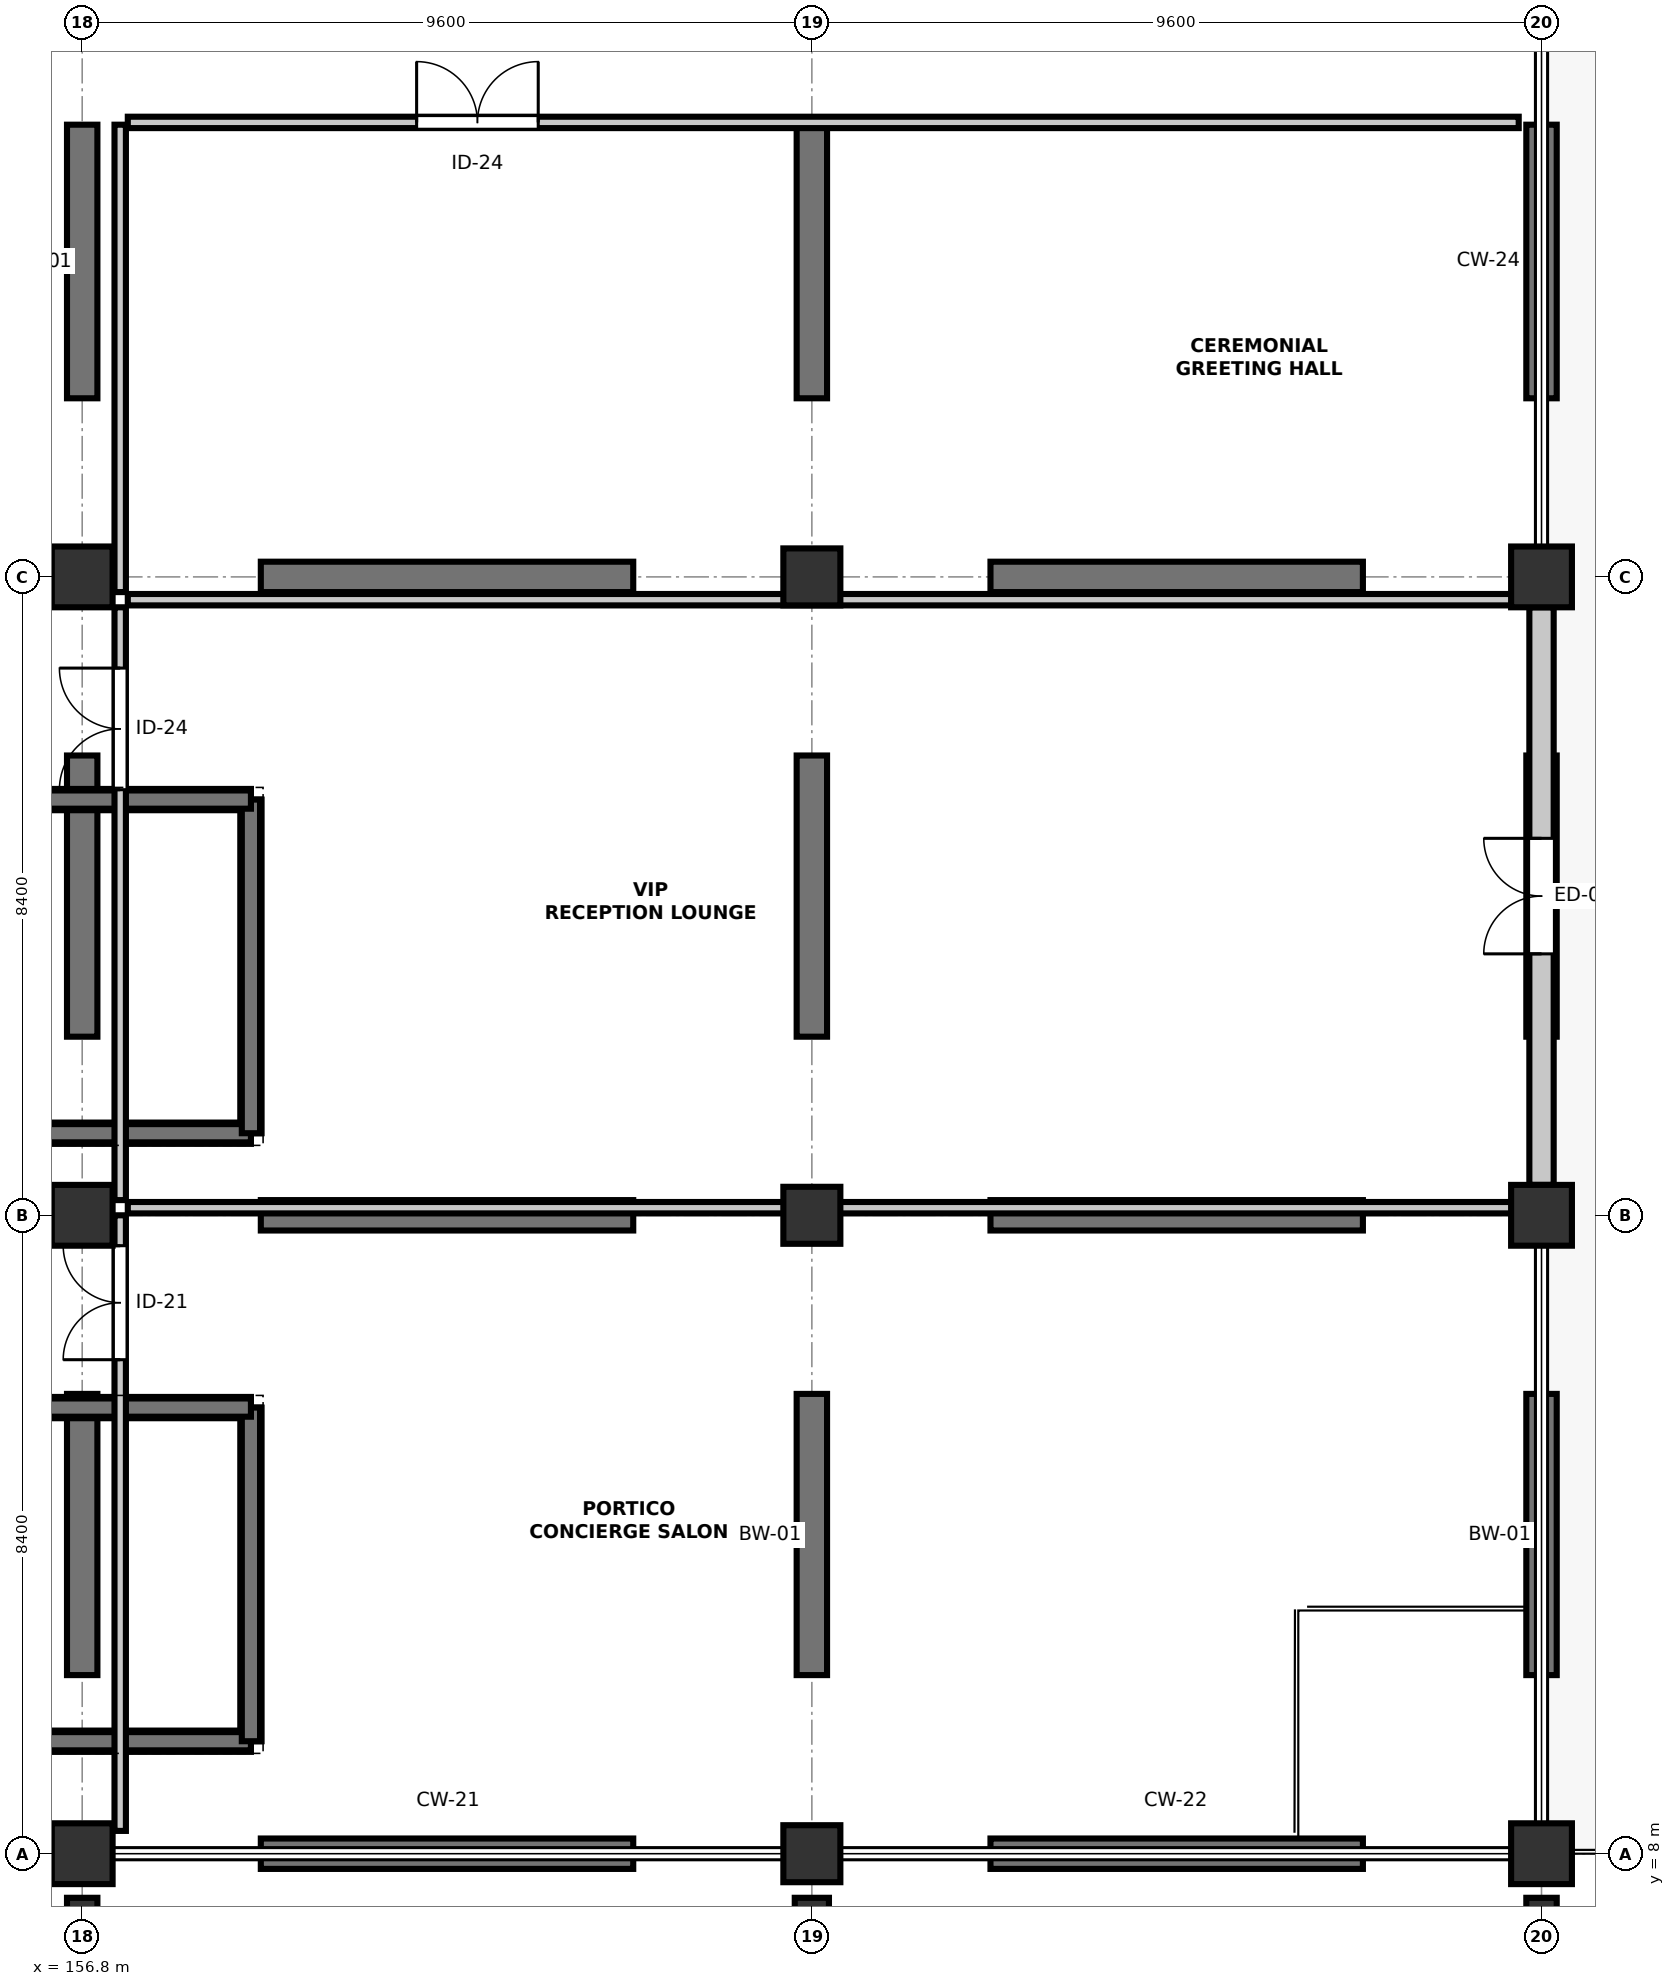
"""IFC4 building model, lengths in metres.
Left out: names, types, materials, properties, quantities, classifications, styles, units other than length and angle.
Written with IfcOpenShell. Run it as: python <this file> out.ifc"""

import sys

from ifc_helpers import new_model, si_unit, direction, frame, frame_2d, origin, origin_2d, place, context, subcontext, project, spatial, rectangle, extrude, element, fill, save


model = new_model("IFC4")
c1 = context("Model", 3, precision=1e-05, world=origin(), true_north=direction((0.0, 1.0)))
c2 = subcontext(c1, "Body", "Model", "MODEL_VIEW")
j1 = project(units=[si_unit("LENGTHUNIT", "METRE"), si_unit("PLANEANGLEUNIT", "RADIAN")], contexts=[c1])
p1 = place(None, origin())
s1 = spatial("IfcSite", under=j1, at=p1, CompositionType="ELEMENT")
p2 = place(p1, origin())
s2 = spatial("IfcBuilding", under=s1, at=p2, CompositionType="ELEMENT")
p3 = place(p2, frame((0.0, 0.0, 4.8)))
s3 = spatial("IfcBuildingStorey", under=s2, at=p3, CompositionType="ELEMENT", Elevation=4.8)
p4 = place(p3, frame((156.8, 8.0, 0.0), z_axis=(0.0, 0.0, 1.0), x_axis=(1.0, 0.0, 0.0)))
e1 = element("IfcColumn", 1, at=p4, inside=s3, PredefinedType="COLUMN", context=c2, shape_type="SweptSolid", body=[
    extrude(rectangle(XDim=0.8, YDim=0.8, at=origin_2d()), origin(), (0.0, 0.0, 1.0), 4.8),
])
p5 = place(p3, frame((156.8, 7.095, 0.0), z_axis=(0.0, 0.0, 1.0), x_axis=(1.0, 0.0, 0.0)))
e2 = element("IfcColumn", 2, at=p5, inside=s3, PredefinedType="PILASTER", context=c2, shape_type="SweptSolid", body=[
    extrude(rectangle(XDim=0.4, YDim=0.65, at=origin_2d()), origin(), (0.0, 0.0, 1.0), 4.8),
])
for number, where, z_axis, x_axis in (
    (3, (156.8, 16.4, 0.0), (0.0, 0.0, 1.0), (1.0, 0.0, 0.0)),
    (4, (156.8, 24.8, 0.0), (0.0, 0.0, 1.0), (1.0, 0.0, 0.0)),
):
    element("IfcColumn", number, at=place(p3, frame(where, z_axis=z_axis, x_axis=x_axis)), inside=s3, PredefinedType="COLUMN", context=c2, shape_type="SweptSolid", body=[
        extrude(rectangle(XDim=0.8, YDim=0.8, at=origin_2d()), origin(), (0.0, 0.0, 1.0), 4.8),
    ])
p6 = place(p3, frame((166.4, 8.0, 0.0), z_axis=(0.0, 0.0, 1.0), x_axis=(1.0, 0.0, 0.0)))
e5 = element("IfcColumn", 5, at=p6, inside=s3, PredefinedType="COLUMN", context=c2, shape_type="SweptSolid", body=[
    extrude(rectangle(XDim=0.75, YDim=0.75, at=origin_2d()), origin(), (0.0, 0.0, 1.0), 4.8),
])
p7 = place(p3, frame((166.4, 7.045, 0.0), z_axis=(0.0, 0.0, 1.0), x_axis=(1.0, 0.0, 0.0)))
e6 = element("IfcColumn", 6, at=p7, inside=s3, PredefinedType="PILASTER", context=c2, shape_type="SweptSolid", body=[
    extrude(rectangle(XDim=0.45, YDim=0.75, at=origin_2d()), origin(), (0.0, 0.0, 1.0), 4.8),
])
for number, where, z_axis, x_axis in (
    (7, (166.4, 16.4, 0.0), (0.0, 0.0, 1.0), (1.0, 0.0, 0.0)),
    (8, (166.4, 24.8, 0.0), (0.0, 0.0, 1.0), (1.0, 0.0, 0.0)),
):
    element("IfcColumn", number, at=place(p3, frame(where, z_axis=z_axis, x_axis=x_axis)), inside=s3, PredefinedType="COLUMN", context=c2, shape_type="SweptSolid", body=[
        extrude(rectangle(XDim=0.75, YDim=0.75, at=origin_2d()), origin(), (0.0, 0.0, 1.0), 4.8),
    ])
p8 = place(p3, frame((176.0, 8.0, 0.0), z_axis=(0.0, 0.0, 1.0), x_axis=(1.0, 0.0, 0.0)))
e9 = element("IfcColumn", 9, at=p8, inside=s3, PredefinedType="COLUMN", context=c2, shape_type="SweptSolid", body=[
    extrude(rectangle(XDim=0.8, YDim=0.8, at=origin_2d()), origin(), (0.0, 0.0, 1.0), 4.8),
])
p9 = place(p3, frame((176.0, 7.095, 0.0), z_axis=(0.0, 0.0, 1.0), x_axis=(1.0, 0.0, 0.0)))
e10 = element("IfcColumn", 10, at=p9, inside=s3, PredefinedType="PILASTER", context=c2, shape_type="SweptSolid", body=[
    extrude(rectangle(XDim=0.4, YDim=0.65, at=origin_2d()), origin(), (0.0, 0.0, 1.0), 4.8),
])
for number, where, z_axis, x_axis in (
    (11, (176.0, 16.4, 0.0), (0.0, 0.0, 1.0), (1.0, 0.0, 0.0)),
    (12, (176.0, 24.8, 0.0), (0.0, 0.0, 1.0), (1.0, 0.0, 0.0)),
):
    element("IfcColumn", number, at=place(p3, frame(where, z_axis=z_axis, x_axis=x_axis)), inside=s3, PredefinedType="COLUMN", context=c2, shape_type="SweptSolid", body=[
        extrude(rectangle(XDim=0.8, YDim=0.8, at=origin_2d()), origin(), (0.0, 0.0, 1.0), 4.8),
    ])
p10 = place(p3, frame((159.15, 8.0, -2.1), z_axis=(0.0, 0.0, 1.0), x_axis=(1.0, 0.0, 0.0)))
e13 = element("IfcWall", 13, at=p10, inside=s3, PredefinedType="SOLIDWALL", context=c2, shape_type="SweptSolid", body=[
    extrude(rectangle(XDim=4.9, YDim=0.4, at=frame_2d((2.45, 0.0))), origin(), (0.0, 0.0, 1.0), 1.85),
])
p11 = place(p3, frame((168.75, 8.0, -2.1), z_axis=(0.0, 0.0, 1.0), x_axis=(1.0, 0.0, 0.0)))
e14 = element("IfcWall", 14, at=p11, inside=s3, PredefinedType="SOLIDWALL", context=c2, shape_type="SweptSolid", body=[
    extrude(rectangle(XDim=4.9, YDim=0.4, at=frame_2d((2.45, 0.0))), origin(), (0.0, 0.0, 1.0), 1.85),
])
p12 = place(p3, frame((159.15, 16.4, -2.1), z_axis=(0.0, 0.0, 1.0), x_axis=(1.0, 0.0, 0.0)))
e15 = element("IfcWall", 15, at=p12, inside=s3, PredefinedType="SOLIDWALL", context=c2, shape_type="SweptSolid", body=[
    extrude(rectangle(XDim=4.9, YDim=0.4, at=frame_2d((2.45, 0.0))), origin(), (0.0, 0.0, 1.0), 1.85),
])
p13 = place(p3, frame((168.75, 16.4, -2.1), z_axis=(0.0, 0.0, 1.0), x_axis=(1.0, 0.0, 0.0)))
e16 = element("IfcWall", 16, at=p13, inside=s3, PredefinedType="SOLIDWALL", context=c2, shape_type="SweptSolid", body=[
    extrude(rectangle(XDim=4.9, YDim=0.4, at=frame_2d((2.45, 0.0))), origin(), (0.0, 0.0, 1.0), 1.85),
])
p14 = place(p3, frame((159.15, 24.8, -2.1), z_axis=(0.0, 0.0, 1.0), x_axis=(1.0, 0.0, 0.0)))
e17 = element("IfcWall", 17, at=p14, inside=s3, PredefinedType="SOLIDWALL", context=c2, shape_type="SweptSolid", body=[
    extrude(rectangle(XDim=4.9, YDim=0.4, at=frame_2d((2.45, 0.0))), origin(), (0.0, 0.0, 1.0), 1.85),
])
p15 = place(p3, frame((168.75, 24.8, -2.1), z_axis=(0.0, 0.0, 1.0), x_axis=(1.0, 0.0, 0.0)))
e18 = element("IfcWall", 18, at=p15, inside=s3, PredefinedType="SOLIDWALL", context=c2, shape_type="SweptSolid", body=[
    extrude(rectangle(XDim=4.9, YDim=0.4, at=frame_2d((2.45, 0.0))), origin(), (0.0, 0.0, 1.0), 1.85),
])
for number, where, z_axis, x_axis in (
    (19, (156.8, 10.35, -2.1), (0.0, 0.0, 1.0), (0.0, 1.0, 0.0)),
    (20, (156.8, 18.75, -2.1), (0.0, 0.0, 1.0), (0.0, 1.0, 0.0)),
):
    element("IfcWall", number, at=place(p3, frame(where, z_axis=z_axis, x_axis=x_axis)), inside=s3, PredefinedType="SOLIDWALL", context=c2, shape_type="SweptSolid", body=[
        extrude(rectangle(XDim=3.7, YDim=0.4, at=frame_2d((1.85, 0.0))), origin(), (0.0, 0.0, 1.0), 1.85),
    ])
p16 = place(p3, frame((156.8, 27.15, -2.1), z_axis=(0.0, 0.0, 1.0), x_axis=(0.0, 1.0, 0.0)))
e21 = element("IfcWall", 21, at=p16, inside=s3, PredefinedType="SOLIDWALL", context=c2, shape_type="SweptSolid", body=[
    extrude(rectangle(XDim=3.6, YDim=0.4, at=frame_2d((1.8, 0.0))), origin(), (0.0, 0.0, 1.0), 1.85),
])
for number, where, z_axis, x_axis in (
    (22, (166.4, 10.35, -2.1), (0.0, 0.0, 1.0), (0.0, 1.0, 0.0)),
    (23, (166.4, 18.75, -2.1), (0.0, 0.0, 1.0), (0.0, 1.0, 0.0)),
):
    element("IfcWall", number, at=place(p3, frame(where, z_axis=z_axis, x_axis=x_axis)), inside=s3, PredefinedType="SOLIDWALL", context=c2, shape_type="SweptSolid", body=[
        extrude(rectangle(XDim=3.7, YDim=0.4, at=frame_2d((1.85, 0.0))), origin(), (0.0, 0.0, 1.0), 1.85),
    ])
p17 = place(p3, frame((166.4, 27.15, -2.1), z_axis=(0.0, 0.0, 1.0), x_axis=(0.0, 1.0, 0.0)))
e24 = element("IfcWall", 24, at=p17, inside=s3, PredefinedType="SOLIDWALL", context=c2, shape_type="SweptSolid", body=[
    extrude(rectangle(XDim=3.6, YDim=0.4, at=frame_2d((1.8, 0.0))), origin(), (0.0, 0.0, 1.0), 1.85),
])
for number, where, z_axis, x_axis in (
    (25, (176.0, 10.35, -2.1), (0.0, 0.0, 1.0), (0.0, 1.0, 0.0)),
    (26, (176.0, 18.75, -2.1), (0.0, 0.0, 1.0), (0.0, 1.0, 0.0)),
):
    element("IfcWall", number, at=place(p3, frame(where, z_axis=z_axis, x_axis=x_axis)), inside=s3, PredefinedType="SOLIDWALL", context=c2, shape_type="SweptSolid", body=[
        extrude(rectangle(XDim=3.7, YDim=0.4, at=frame_2d((1.85, 0.0))), origin(), (0.0, 0.0, 1.0), 1.85),
    ])
p18 = place(p3, frame((176.0, 27.15, -2.1), z_axis=(0.0, 0.0, 1.0), x_axis=(0.0, 1.0, 0.0)))
e27 = element("IfcWall", 27, at=p18, inside=s3, PredefinedType="SOLIDWALL", context=c2, shape_type="SweptSolid", body=[
    extrude(rectangle(XDim=3.6, YDim=0.4, at=frame_2d((1.8, 0.0))), origin(), (0.0, 0.0, 1.0), 1.85),
])
p19 = place(p3, frame((149.68, 9.48, -2.1), z_axis=(0.0, 0.0, 1.0), x_axis=(1.0, 0.0, 0.0)))
e28 = element("IfcWall", 28, at=p19, inside=s3, PredefinedType="SOLIDWALL", context=c2, shape_type="SweptSolid", body=[
    extrude(rectangle(XDim=9.34, YDim=0.28, at=frame_2d((4.67, 0.0))), origin(), (0.0, 0.0, 1.0), 1.8),
])
p20 = place(p3, frame((159.02, 9.48, -2.1), z_axis=(0.0, 0.0, 1.0), x_axis=(0.0, 1.0, 0.0)))
e29 = element("IfcWall", 29, at=p20, inside=s3, PredefinedType="SOLIDWALL", context=c2, shape_type="SweptSolid", body=[
    extrude(rectangle(XDim=4.39, YDim=0.28, at=frame_2d((2.195, 0.0))), origin(), (0.0, 0.0, 1.0), 1.8),
])
for number, where, z_axis, x_axis in (
    (30, (159.02, 13.87, -2.1), (0.0, 0.0, 1.0), (-1.0, 0.0, 0.0)),
    (31, (149.68, 17.48, -2.1), (0.0, 0.0, 1.0), (1.0, 0.0, 0.0)),
):
    element("IfcWall", number, at=place(p3, frame(where, z_axis=z_axis, x_axis=x_axis)), inside=s3, PredefinedType="SOLIDWALL", context=c2, shape_type="SweptSolid", body=[
        extrude(rectangle(XDim=9.34, YDim=0.28, at=frame_2d((4.67, 0.0))), origin(), (0.0, 0.0, 1.0), 1.8),
    ])
p21 = place(p3, frame((159.02, 17.48, -2.1), z_axis=(0.0, 0.0, 1.0), x_axis=(0.0, 1.0, 0.0)))
e32 = element("IfcWall", 32, at=p21, inside=s3, PredefinedType="SOLIDWALL", context=c2, shape_type="SweptSolid", body=[
    extrude(rectangle(XDim=4.39, YDim=0.28, at=frame_2d((2.195, 0.0))), origin(), (0.0, 0.0, 1.0), 1.8),
])
p22 = place(p3, frame((159.02, 21.87, -2.1), z_axis=(0.0, 0.0, 1.0), x_axis=(-1.0, 0.0, 0.0)))
e33 = element("IfcWall", 33, at=p22, inside=s3, PredefinedType="SOLIDWALL", context=c2, shape_type="SweptSolid", body=[
    extrude(rectangle(XDim=9.34, YDim=0.28, at=frame_2d((4.67, 0.0))), origin(), (0.0, 0.0, 1.0), 1.8),
])
p23 = place(p3, frame((176.0, 16.8, 0.0), z_axis=(0.0, 0.0, 1.0), x_axis=(0.0, 1.0, 0.0)))
e34 = element("IfcWall", 34, at=p23, inside=s3, PredefinedType="STANDARD", context=c2, shape_type="SweptSolid", body=[
    extrude(rectangle(XDim=7.6, YDim=0.32, at=frame_2d((3.8, 0.0))), origin(), (0.0, 0.0, 1.0), 4.115),
])
p24 = place(p23, frame((3.04, 0.0, 0.0)))
e35 = element("IfcOpeningElement", 35, at=p24, cuts=e34, PredefinedType="OPENING", context=c2, shape_type="SweptSolid", body=[
    extrude(rectangle(XDim=1.52, YDim=2.22, at=frame_2d((0.76, 1.11))), frame((0.0, 0.17, 0.0), z_axis=(0.0, -1.0, 0.0), x_axis=(1.0, 0.0, 0.0)), (0.0, 0.0, 1.0), 0.34),
])
p25 = place(p3, frame((149.68, 9.48, 0.0), z_axis=(0.0, 0.0, 1.0), x_axis=(1.0, 0.0, 0.0)))
e36 = element("IfcWall", 36, at=p25, inside=s3, PredefinedType="SHEAR", context=c2, shape_type="SweptSolid", body=[
    extrude(rectangle(XDim=9.34, YDim=0.24, at=frame_2d((4.67, 0.0))), origin(), (0.0, 0.0, 1.0), 4.55),
])
p26 = place(p3, frame((159.02, 9.48, 0.0), z_axis=(0.0, 0.0, 1.0), x_axis=(0.0, 1.0, 0.0)))
e37 = element("IfcWall", 37, at=p26, inside=s3, PredefinedType="SHEAR", context=c2, shape_type="SweptSolid", body=[
    extrude(rectangle(XDim=4.39, YDim=0.24, at=frame_2d((2.195, 0.0))), origin(), (0.0, 0.0, 1.0), 4.55),
])
for number, where, z_axis, x_axis in (
    (38, (159.02, 13.87, 0.0), (0.0, 0.0, 1.0), (-1.0, 0.0, 0.0)),
    (39, (149.68, 17.48, 0.0), (0.0, 0.0, 1.0), (1.0, 0.0, 0.0)),
):
    element("IfcWall", number, at=place(p3, frame(where, z_axis=z_axis, x_axis=x_axis)), inside=s3, PredefinedType="SHEAR", context=c2, shape_type="SweptSolid", body=[
        extrude(rectangle(XDim=9.34, YDim=0.24, at=frame_2d((4.67, 0.0))), origin(), (0.0, 0.0, 1.0), 4.55),
    ])
p27 = place(p3, frame((159.02, 17.48, 0.0), z_axis=(0.0, 0.0, 1.0), x_axis=(0.0, 1.0, 0.0)))
e40 = element("IfcWall", 40, at=p27, inside=s3, PredefinedType="SHEAR", context=c2, shape_type="SweptSolid", body=[
    extrude(rectangle(XDim=4.39, YDim=0.24, at=frame_2d((2.195, 0.0))), origin(), (0.0, 0.0, 1.0), 4.55),
])
p28 = place(p3, frame((159.02, 21.87, 0.0), z_axis=(0.0, 0.0, 1.0), x_axis=(-1.0, 0.0, 0.0)))
e41 = element("IfcWall", 41, at=p28, inside=s3, PredefinedType="SHEAR", context=c2, shape_type="SweptSolid", body=[
    extrude(rectangle(XDim=9.34, YDim=0.24, at=frame_2d((4.67, 0.0))), origin(), (0.0, 0.0, 1.0), 4.55),
])
p29 = place(p3, frame((157.3, 16.6, 0.0), z_axis=(0.0, 0.0, 1.0), x_axis=(0.0, 1.0, 0.0)))
e42 = element("IfcWall", 42, at=p29, inside=s3, PredefinedType="PARTITIONING", context=c2, shape_type="SweptSolid", body=[
    extrude(rectangle(XDim=7.8, YDim=0.15, at=frame_2d((3.9, 0.0))), origin(), (0.0, 0.0, 1.0), 4.047),
])
p30 = place(p29, frame((5.4, 0.0, 0.0)))
e43 = element("IfcOpeningElement", 43, at=p30, cuts=e42, PredefinedType="OPENING", context=c2, shape_type="SweptSolid", body=[
    extrude(rectangle(XDim=1.6, YDim=2.28, at=frame_2d((0.8, 1.14))), frame((0.0, 0.085, 0.0), z_axis=(0.0, -1.0, 0.0), x_axis=(1.0, 0.0, 0.0)), (0.0, 0.0, 1.0), 0.17),
])
p31 = place(p3, frame((157.4, 24.5, 0.0), z_axis=(0.0, 0.0, 1.0), x_axis=(1.0, 0.0, 0.0)))
e44 = element("IfcWall", 44, at=p31, inside=s3, PredefinedType="PARTITIONING", context=c2, shape_type="SweptSolid", body=[
    extrude(rectangle(XDim=18.3, YDim=0.15, at=frame_2d((9.15, 0.0))), origin(), (0.0, 0.0, 1.0), 4.125),
])
p32 = place(p3, frame((157.4, 30.78, 0.0), z_axis=(0.0, 0.0, 1.0), x_axis=(1.0, 0.0, 0.0)))
e45 = element("IfcWall", 45, at=p32, inside=s3, PredefinedType="PARTITIONING", context=c2, shape_type="SweptSolid", body=[
    extrude(rectangle(XDim=18.3, YDim=0.15, at=frame_2d((9.15, 0.0))), origin(), (0.0, 0.0, 1.0), 4.125),
])
p33 = place(p32, frame((3.8, 0.0, 0.0)))
e46 = element("IfcOpeningElement", 46, at=p33, cuts=e45, PredefinedType="OPENING", context=c2, shape_type="SweptSolid", body=[
    extrude(rectangle(XDim=1.6, YDim=2.28, at=frame_2d((0.8, 1.14))), frame((0.0, 0.085, 0.0), z_axis=(0.0, -1.0, 0.0), x_axis=(1.0, 0.0, 0.0)), (0.0, 0.0, 1.0), 0.17),
])
p34 = place(p3, frame((157.3, 24.6, 0.0), z_axis=(0.0, 0.0, 1.0), x_axis=(0.0, 1.0, 0.0)))
e47 = element("IfcWall", 47, at=p34, inside=s3, PredefinedType="PARTITIONING", context=c2, shape_type="SweptSolid", body=[
    extrude(rectangle(XDim=6.15, YDim=0.15, at=frame_2d((3.075, 0.0))), origin(), (0.0, 0.0, 1.0), 4.047),
])
p35 = place(p3, frame((157.3, 8.3, 0.0), z_axis=(0.0, 0.0, 1.0), x_axis=(0.0, 1.0, 0.0)))
e48 = element("IfcWall", 48, at=p35, inside=s3, PredefinedType="PARTITIONING", context=c2, shape_type="SweptSolid", body=[
    extrude(rectangle(XDim=8.1, YDim=0.15, at=frame_2d((4.05, 0.0))), origin(), (0.0, 0.0, 1.0), 4.047),
])
p36 = place(p35, frame((6.2, 0.0, 0.0)))
e49 = element("IfcOpeningElement", 49, at=p36, cuts=e48, PredefinedType="OPENING", context=c2, shape_type="SweptSolid", body=[
    extrude(rectangle(XDim=1.5, YDim=2.24, at=frame_2d((0.75, 1.12))), frame((0.0, 0.085, 0.0), z_axis=(0.0, -1.0, 0.0), x_axis=(1.0, 0.0, 0.0)), (0.0, 0.0, 1.0), 0.17),
])
p37 = place(p3, frame((157.4, 16.5, 0.0), z_axis=(0.0, 0.0, 1.0), x_axis=(1.0, 0.0, 0.0)))
e50 = element("IfcWall", 50, at=p37, inside=s3, PredefinedType="PARTITIONING", context=c2, shape_type="SweptSolid", body=[
    extrude(rectangle(XDim=18.3, YDim=0.15, at=frame_2d((9.15, 0.0))), origin(), (0.0, 0.0, 1.0), 4.027),
])
p38 = place(p24, origin())
e51 = element("IfcDoor", 51, at=p38, inside=s3, OperationType="DOUBLE_DOOR_SINGLE_SWING", PredefinedType="DOOR", context=c2, shape_type="SweptSolid", body=[
    extrude(rectangle(XDim=1.52, YDim=2.22, at=frame_2d((0.76, 1.11))), frame((0.0, 0.025, 0.0), z_axis=(0.0, -1.0, 0.0), x_axis=(1.0, 0.0, 0.0)), (0.0, 0.0, 1.0), 0.05),
])
fill(e35, e51)
p39 = place(p30, origin())
e52 = element("IfcDoor", 52, at=p39, inside=s3, OperationType="DOUBLE_DOOR_SINGLE_SWING", PredefinedType="DOOR", context=c2, shape_type="SweptSolid", body=[
    extrude(rectangle(XDim=1.6, YDim=2.28, at=frame_2d((0.8, 1.14))), frame((0.0, 0.025, 0.0), z_axis=(0.0, -1.0, 0.0), x_axis=(1.0, 0.0, 0.0)), (0.0, 0.0, 1.0), 0.05),
])
fill(e43, e52)
p40 = place(p33, origin())
e53 = element("IfcDoor", 53, at=p40, inside=s3, OperationType="DOUBLE_DOOR_SINGLE_SWING", PredefinedType="DOOR", context=c2, shape_type="SweptSolid", body=[
    extrude(rectangle(XDim=1.6, YDim=2.28, at=frame_2d((0.8, 1.14))), frame((0.0, 0.025, 0.0), z_axis=(0.0, -1.0, 0.0), x_axis=(1.0, 0.0, 0.0)), (0.0, 0.0, 1.0), 0.05),
])
fill(e46, e53)
p41 = place(p36, origin())
e54 = element("IfcDoor", 54, at=p41, inside=s3, OperationType="DOUBLE_DOOR_SINGLE_SWING", PredefinedType="DOOR", context=c2, shape_type="SweptSolid", body=[
    extrude(rectangle(XDim=1.5, YDim=2.24, at=frame_2d((0.75, 1.12))), frame((0.0, 0.025, 0.0), z_axis=(0.0, -1.0, 0.0), x_axis=(1.0, 0.0, 0.0)), (0.0, 0.0, 1.0), 0.05),
])
fill(e49, e54)
save(model, sys.argv[1])
